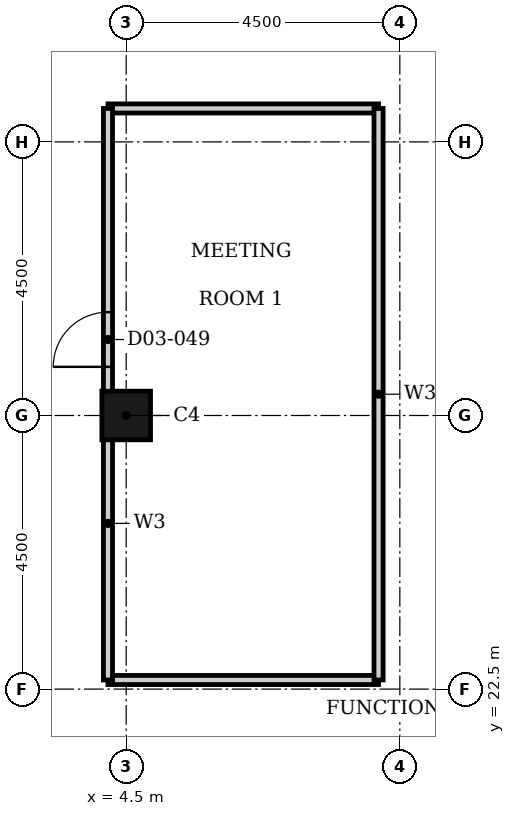
"""IFC4 building model, lengths in metres.
Left out: names, types, materials, properties, quantities, classifications, styles, units other than length and angle.
Written with IfcOpenShell. Run it as: python <this file> out.ifc"""

import sys

from ifc_helpers import new_model, si_unit, direction, frame, frame_2d, origin, origin_2d, place, context, subcontext, project, spatial, rectangle, hollow_rectangle, extrude, element, fill, save


model = new_model("IFC4")
c1 = context("Model", 3, precision=1e-05, world=origin(), true_north=direction((0.0, 1.0)))
c2 = subcontext(c1, "Body", "Model", "MODEL_VIEW")
j1 = project(units=[si_unit("LENGTHUNIT", "METRE"), si_unit("PLANEANGLEUNIT", "RADIAN")], contexts=[c1])
p1 = place(None, origin())
s1 = spatial("IfcSite", under=j1, at=p1, CompositionType="ELEMENT")
p2 = place(p1, origin())
s2 = spatial("IfcBuilding", under=s1, at=p2, CompositionType="ELEMENT")
p3 = place(p2, frame((0.0, 0.0, 17.4)))
s3 = spatial("IfcBuildingStorey", under=s2, at=p3, CompositionType="ELEMENT", Elevation=17.4)
p4 = place(p3, frame((4.5, 27.0, 0.0), z_axis=(0.0, 0.0, 1.0), x_axis=(1.0, 0.0, 0.0)))
e1 = element("IfcColumn", 1, at=p4, inside=s3, PredefinedType="COLUMN", context=c2, shape_type="SweptSolid", body=[
    extrude(hollow_rectangle(XDim=0.8, YDim=0.8, WallThickness=0.025, at=origin_2d()), origin(), (0.0, 0.0, 1.0), 6.6),
])
for number, where, z_axis, x_axis in (
    (2, (4.2, 22.65, 0.0), (0.0, 0.0, 1.0), (1.0, 0.0, 0.0)),
    (3, (4.2, 32.05, 0.0), (0.0, 0.0, 1.0), (1.0, 0.0, 0.0)),
):
    element("IfcWall", number, at=place(p3, frame(where, z_axis=z_axis, x_axis=x_axis)), inside=s3, PredefinedType="PARTITIONING", context=c2, shape_type="SweptSolid", body=[
        extrude(rectangle(XDim=4.45, YDim=0.15, at=frame_2d((2.225, 0.0))), origin(), (0.0, 0.0, 1.0), 6.25),
    ])
p5 = place(p3, frame((4.2, 22.65, 0.0), z_axis=(0.0, 0.0, 1.0), x_axis=(0.0, 1.0, 0.0)))
e4 = element("IfcWall", 4, at=p5, inside=s3, PredefinedType="PARTITIONING", context=c2, shape_type="SweptSolid", body=[
    extrude(rectangle(XDim=9.4, YDim=0.15, at=frame_2d((4.7, 0.0))), origin(), (0.0, 0.0, 1.0), 6.25),
])
p6 = place(p5, frame((5.15, 0.0, 0.0)))
e5 = element("IfcOpeningElement", 5, at=p6, cuts=e4, PredefinedType="OPENING", context=c2, shape_type="SweptSolid", body=[
    extrude(rectangle(XDim=0.9, YDim=2.1, at=frame_2d((0.45, 1.05))), frame((0.0, 0.085, 0.0), z_axis=(0.0, -1.0, 0.0), x_axis=(1.0, 0.0, 0.0)), (0.0, 0.0, 1.0), 0.17),
])
p7 = place(p3, frame((8.65, 22.65, 0.0), z_axis=(0.0, 0.0, 1.0), x_axis=(0.0, 1.0, 0.0)))
e6 = element("IfcWall", 6, at=p7, inside=s3, PredefinedType="PARTITIONING", context=c2, shape_type="SweptSolid", body=[
    extrude(rectangle(XDim=9.4, YDim=0.15, at=frame_2d((4.7, 0.0))), origin(), (0.0, 0.0, 1.0), 6.25),
])
p8 = place(p6, origin())
e7 = element("IfcDoor", 7, at=p8, inside=s3, OperationType="SINGLE_SWING_RIGHT", PredefinedType="DOOR", context=c2, shape_type="SweptSolid", body=[
    extrude(rectangle(XDim=0.9, YDim=2.1, at=frame_2d((0.45, 1.05))), frame((0.0, 0.025, 0.0), z_axis=(0.0, -1.0, 0.0), x_axis=(1.0, 0.0, 0.0)), (0.0, 0.0, 1.0), 0.05),
])
fill(e5, e7)
save(model, sys.argv[1])
